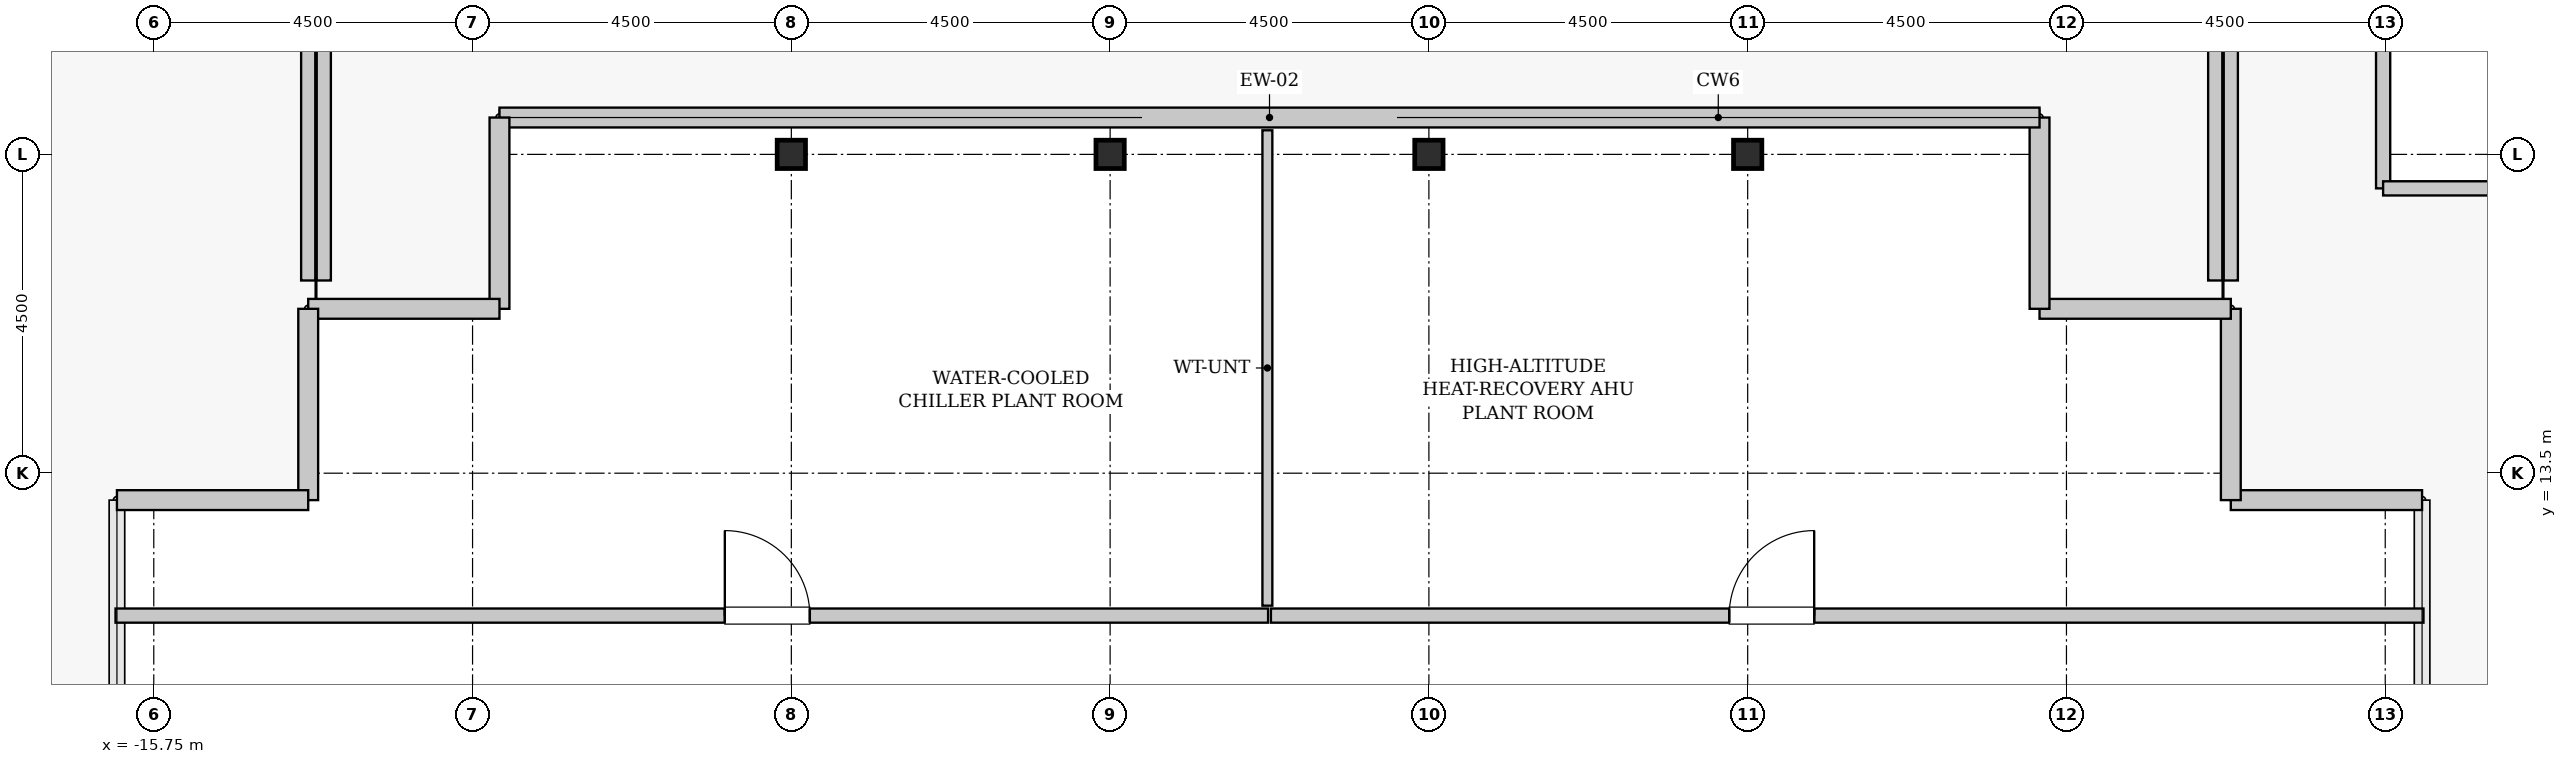
"""IFC4 building model, lengths in metres.
Left out: names, types, materials, properties, quantities, classifications, styles, units other than length and angle.
Written with IfcOpenShell. Run it as: python <this file> out.ifc"""

import sys

from ifc_helpers import new_model, si_unit, direction, frame, frame_2d, origin, origin_2d, place, context, subcontext, project, spatial, rectangle, hollow_rectangle, extrude, source, transform, mapped, element, fill, save


model = new_model("IFC4")
c1 = context("Model", 3, precision=1e-05, world=origin(), true_north=direction((0.0, 1.0)))
c2 = subcontext(c1, "Body", "Model", "MODEL_VIEW")
j1 = project(units=[si_unit("LENGTHUNIT", "METRE"), si_unit("PLANEANGLEUNIT", "RADIAN")], contexts=[c1])
p1 = place(None, origin())
s1 = spatial("IfcSite", under=j1, at=p1, CompositionType="ELEMENT")
p2 = place(p1, origin())
s2 = spatial("IfcBuilding", under=s1, at=p2, CompositionType="ELEMENT")
p3 = place(p2, frame((0.0, 0.0, 358.6)))
s3 = spatial("IfcBuildingStorey", under=s2, at=p3, CompositionType="ELEMENT", Elevation=358.6)
m1 = source(origin(), c2, "Body", "SweptSolid", [
    extrude(hollow_rectangle(XDim=0.4, YDim=0.4, WallThickness=0.02, InnerFilletRadius=0.02, OuterFilletRadius=0.04, at=origin_2d()), origin(), (0.0, 0.0, 1.0), 4.4),
])
for number, where, z_axis, x_axis in (
    (1, (-6.75, 18.0, 0.0), (0.0, 0.0, 1.0), (1.0, 0.0, 0.0)),
    (2, (-2.25, 18.0, 0.0), (0.0, 0.0, 1.0), (1.0, 0.0, 0.0)),
    (3, (2.25, 18.0, 0.0), (0.0, 0.0, 1.0), (1.0, 0.0, 0.0)),
    (4, (6.75, 18.0, 0.0), (0.0, 0.0, 1.0), (1.0, 0.0, 0.0)),
):
    element("IfcColumn", number, at=place(p3, frame(where, z_axis=z_axis, x_axis=x_axis)), inside=s3, PredefinedType="COLUMN", context=c2, shape_type="MappedRepresentation", body=[
        mapped(m1, transform((0.0, 0.0, 0.0), x_axis=(1.0, 0.0, 0.0), y_axis=(0.0, 1.0, 0.0), z_axis=(0.0, 0.0, 1.0), scale=1.0)),
    ])
m2 = source(origin(), c2, "Body", "SweptSolid", [
    extrude(rectangle(XDim=6.7, YDim=0.2, at=frame_2d((3.35, 0.0))), origin(), (0.0, 0.0, 1.0), 1.15),
])
p4 = place(p3, frame((-13.57, 22.92, 0.0), z_axis=(0.0, 0.0, 1.0), x_axis=(0.0, -1.0, 0.0)))
e5 = element("IfcWall", 5, at=p4, inside=s3, PredefinedType="PARAPET", context=c2, shape_type="MappedRepresentation", body=[
    mapped(m2, transform((0.0, 0.0, 0.0), x_axis=(1.0, 0.0, 0.0), y_axis=(0.0, 1.0, 0.0), z_axis=(0.0, 0.0, 1.0), scale=1.0)),
])
m3 = source(origin(), c2, "Body", "SweptSolid", [
    extrude(rectangle(XDim=4.0, YDim=0.2, at=frame_2d((2.0, 0.0))), origin(), (0.0, 0.0, 1.0), 1.15),
])
p5 = place(p3, frame((13.57, 16.22, 0.0), z_axis=(0.0, 0.0, 1.0), x_axis=(0.0, 1.0, 0.0)))
e6 = element("IfcWall", 6, at=p5, inside=s3, PredefinedType="PARAPET", context=c2, shape_type="MappedRepresentation", body=[
    mapped(m3, transform((0.0, 0.0, 0.0), x_axis=(1.0, 0.0, 0.0), y_axis=(0.0, 1.0, 0.0), z_axis=(0.0, 0.0, 1.0), scale=1.0)),
])
m4 = source(origin(), c2, "Body", "SweptSolid", [
    extrude(rectangle(XDim=2.7, YDim=0.2, at=frame_2d((1.35, 0.0))), origin(), (0.0, 0.0, 1.0), 1.15),
])
for number, where, z_axis, x_axis in (
    (7, (15.72, 20.22, 0.0), (0.0, 0.0, 1.0), (0.0, -1.0, 0.0)),
    (8, (15.72, 17.52, 0.0), (0.0, 0.0, 1.0), (1.0, 0.0, 0.0)),
):
    element("IfcWall", number, at=place(p3, frame(where, z_axis=z_axis, x_axis=x_axis)), inside=s3, PredefinedType="PARAPET", context=c2, shape_type="MappedRepresentation", body=[
        mapped(m4, transform((0.0, 0.0, 0.0), x_axis=(1.0, 0.0, 0.0), y_axis=(0.0, 1.0, 0.0), z_axis=(0.0, 0.0, 1.0), scale=1.0)),
    ])
p6 = place(p3, frame((13.35, 20.22, 0.0), z_axis=(0.0, 0.0, 1.0), x_axis=(0.0, -1.0, 0.0)))
e9 = element("IfcWall", 9, at=p6, inside=s3, PredefinedType="PARAPET", context=c2, shape_type="MappedRepresentation", body=[
    mapped(m3, transform((0.0, 0.0, 0.0), x_axis=(1.0, 0.0, 0.0), y_axis=(0.0, 1.0, 0.0), z_axis=(0.0, 0.0, 1.0), scale=1.0)),
])
p7 = place(p3, frame((-13.35, 16.22, 0.0), z_axis=(0.0, 0.0, 1.0), x_axis=(0.0, 1.0, 0.0)))
e10 = element("IfcWall", 10, at=p7, inside=s3, PredefinedType="PARAPET", context=c2, shape_type="MappedRepresentation", body=[
    mapped(m2, transform((0.0, 0.0, 0.0), x_axis=(1.0, 0.0, 0.0), y_axis=(0.0, 1.0, 0.0), z_axis=(0.0, 0.0, 1.0), scale=1.0)),
])
m5 = source(origin(), c2, "Body", "SweptSolid", [
    extrude(rectangle(XDim=2.7, YDim=0.28, at=frame_2d((1.35, 0.0))), origin(), (0.0, 0.0, 1.0), 4.1),
])
for number, where, z_axis, x_axis in (
    (11, (16.27, 13.12, 0.0), (0.0, 0.0, 1.0), (-1.0, 0.0, 0.0)),
    (12, (13.57, 13.12, 0.0), (0.0, 0.0, 1.0), (0.0, 1.0, 0.0)),
    (13, (13.57, 15.82, 0.0), (0.0, 0.0, 1.0), (-1.0, 0.0, 0.0)),
    (14, (10.87, 15.82, 0.0), (0.0, 0.0, 1.0), (0.0, 1.0, 0.0)),
):
    element("IfcWall", number, at=place(p3, frame(where, z_axis=z_axis, x_axis=x_axis)), inside=s3, PredefinedType="SOLIDWALL", context=c2, shape_type="MappedRepresentation", body=[
        mapped(m5, transform((0.0, 0.0, 0.0), x_axis=(1.0, 0.0, 0.0), y_axis=(0.0, 1.0, 0.0), z_axis=(0.0, 0.0, 1.0), scale=1.0)),
    ])
m6 = source(origin(), c2, "Body", "SweptSolid", [
    extrude(rectangle(XDim=21.74, YDim=0.28, at=frame_2d((10.87, 0.0))), origin(), (0.0, 0.0, 1.0), 1.1),
])
p8 = place(p3, frame((10.87, 18.52, 0.0), z_axis=(0.0, 0.0, 1.0), x_axis=(-1.0, 0.0, 0.0)))
e15 = element("IfcWall", 15, at=p8, inside=s3, PredefinedType="SOLIDWALL", context=c2, shape_type="MappedRepresentation", body=[
    mapped(m6, transform((0.0, 0.0, 0.0), x_axis=(1.0, 0.0, 0.0), y_axis=(0.0, 1.0, 0.0), z_axis=(0.0, 0.0, 1.0), scale=1.0)),
])
for number, where, z_axis, x_axis in (
    (16, (-10.87, 18.52, 0.0), (0.0, 0.0, 1.0), (0.0, -1.0, 0.0)),
    (17, (-10.87, 15.82, 0.0), (0.0, 0.0, 1.0), (-1.0, 0.0, 0.0)),
    (18, (-13.57, 15.82, 0.0), (0.0, 0.0, 1.0), (0.0, -1.0, 0.0)),
    (19, (-13.57, 13.12, 0.0), (0.0, 0.0, 1.0), (-1.0, 0.0, 0.0)),
):
    element("IfcWall", number, at=place(p3, frame(where, z_axis=z_axis, x_axis=x_axis)), inside=s3, PredefinedType="SOLIDWALL", context=c2, shape_type="MappedRepresentation", body=[
        mapped(m5, transform((0.0, 0.0, 0.0), x_axis=(1.0, 0.0, 0.0), y_axis=(0.0, 1.0, 0.0), z_axis=(0.0, 0.0, 1.0), scale=1.0)),
    ])
m7 = source(origin(), c2, "Body", "SweptSolid", [
    extrude(rectangle(XDim=16.27, YDim=0.2, at=frame_2d((8.135, 0.0))), origin(), (0.0, 0.0, 1.0), 4.085),
])
p9 = place(p3, frame((-16.29, 11.49, 0.0), z_axis=(0.0, 0.0, 1.0), x_axis=(1.0, 0.0, 0.0)))
e20 = element("IfcWall", 20, at=p9, inside=s3, PredefinedType="SOLIDWALL", context=c2, shape_type="MappedRepresentation", body=[
    mapped(m7, transform((0.0, 0.0, 0.0), x_axis=(1.0, 0.0, 0.0), y_axis=(0.0, 1.0, 0.0), z_axis=(0.0, 0.0, 1.0), scale=1.0)),
])
p10 = place(p9, frame((8.601, 0.0, 0.0)))
e21 = element("IfcOpeningElement", 21, at=p10, cuts=e20, PredefinedType="OPENING", context=c2, shape_type="SweptSolid", body=[
    extrude(rectangle(XDim=1.2, YDim=2.15, at=frame_2d((0.6, 1.075))), frame((0.0, 0.11, 0.0), z_axis=(0.0, -1.0, 0.0), x_axis=(1.0, 0.0, 0.0)), (0.0, 0.0, 1.0), 0.22),
])
m8 = source(origin(), c2, "Body", "SweptSolid", [
    extrude(rectangle(XDim=6.71, YDim=0.14, at=frame_2d((3.355, 0.0))), origin(), (0.0, 0.0, 1.0), 4.085),
])
p11 = place(p3, frame((-0.03, 11.63, 0.0), z_axis=(0.0, 0.0, 1.0), x_axis=(0.0, 1.0, 0.0)))
e22 = element("IfcWall", 22, at=p11, inside=s3, PredefinedType="PARTITIONING", context=c2, shape_type="MappedRepresentation", body=[
    mapped(m8, transform((0.0, 0.0, 0.0), x_axis=(1.0, 0.0, 0.0), y_axis=(0.0, 1.0, 0.0), z_axis=(0.0, 0.0, 1.0), scale=1.0)),
])
p12 = place(p3, frame((0.02, 11.49, 0.0), z_axis=(0.0, 0.0, 1.0), x_axis=(1.0, 0.0, 0.0)))
e23 = element("IfcWall", 23, at=p12, inside=s3, PredefinedType="SOLIDWALL", context=c2, shape_type="MappedRepresentation", body=[
    mapped(m7, transform((0.0, 0.0, 0.0), x_axis=(1.0, 0.0, 0.0), y_axis=(0.0, 1.0, 0.0), z_axis=(0.0, 0.0, 1.0), scale=1.0)),
])
p13 = place(p12, frame((6.469, 0.0, 0.0)))
e24 = element("IfcOpeningElement", 24, at=p13, cuts=e23, PredefinedType="OPENING", context=c2, shape_type="SweptSolid", body=[
    extrude(rectangle(XDim=1.2, YDim=2.15, at=frame_2d((0.6, 1.075))), frame((0.0, 0.11, 0.0), z_axis=(0.0, -1.0, 0.0), x_axis=(1.0, 0.0, 0.0)), (0.0, 0.0, 1.0), 0.22),
])
m9 = source(origin(), c2, "Body", "SweptSolid", [
    extrude(rectangle(XDim=1.2, YDim=2.15, at=frame_2d((0.6, 1.075))), frame((0.0, 0.025, 0.0), z_axis=(0.0, -1.0, 0.0), x_axis=(1.0, 0.0, 0.0)), (0.0, 0.0, 1.0), 0.05),
])
p14 = place(p10, origin())
e25 = element("IfcDoor", 25, at=p14, inside=s3, OperationType="SINGLE_SWING_LEFT", PredefinedType="DOOR", context=c2, shape_type="MappedRepresentation", body=[
    mapped(m9, transform((0.0, 0.0, 0.0), x_axis=(1.0, 0.0, 0.0), y_axis=(0.0, 1.0, 0.0), z_axis=(0.0, 0.0, 1.0), scale=1.0)),
])
fill(e21, e25)
p15 = place(p13, origin())
e26 = element("IfcDoor", 26, at=p15, inside=s3, OperationType="SINGLE_SWING_RIGHT", PredefinedType="DOOR", context=c2, shape_type="MappedRepresentation", body=[
    mapped(m9, transform((0.0, 0.0, 0.0), x_axis=(1.0, 0.0, 0.0), y_axis=(0.0, 1.0, 0.0), z_axis=(0.0, 0.0, 1.0), scale=1.0)),
])
fill(e24, e26)
save(model, sys.argv[1])
